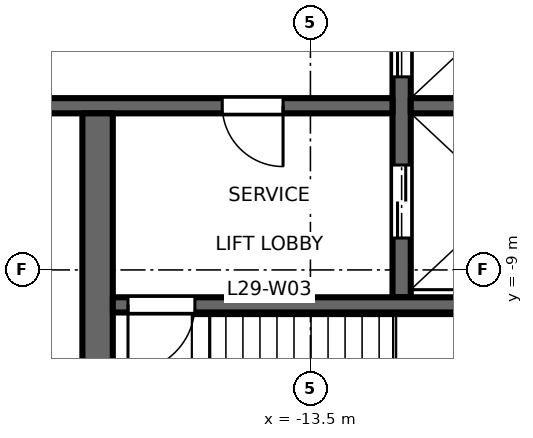
"""IFC4 building model, lengths in metres.
Left out: names, types, materials, properties, quantities, classifications, styles, units other than length and angle.
Written with IfcOpenShell. Run it as: python <this file> out.ifc"""

import sys

from ifc_helpers import new_model, si_unit, direction, frame, frame_2d, origin, place, context, subcontext, project, spatial, rectangle, extrude, element, fill, save


model = new_model("IFC4")
c1 = context("Model", 3, precision=1e-05, world=origin(), true_north=direction((0.0, 1.0)))
c2 = subcontext(c1, "Body", "Model", "MODEL_VIEW")
j1 = project(units=[si_unit("LENGTHUNIT", "METRE"), si_unit("PLANEANGLEUNIT", "RADIAN")], contexts=[c1])
p1 = place(None, origin())
s1 = spatial("IfcSite", under=j1, at=p1, CompositionType="ELEMENT")
p2 = place(p1, origin())
s2 = spatial("IfcBuilding", under=s1, at=p2, CompositionType="ELEMENT")
p3 = place(p2, frame((0.0, 0.0, 136.2)))
s3 = spatial("IfcBuildingStorey", under=s2, at=p3, CompositionType="ELEMENT", Elevation=136.2)
p4 = place(p3, frame((-12.0, -9.45, 0.0), z_axis=(0.0, 0.0, 1.0), x_axis=(0.0, 1.0, 0.0)))
e1 = element("IfcWall", 1, at=p4, inside=s3, PredefinedType="SHEAR", context=c2, shape_type="SweptSolid", body=[
    extrude(rectangle(XDim=18.9, YDim=0.3, at=frame_2d((9.45, 0.0))), origin(), (0.0, 0.0, 1.0), 4.35),
])
p5 = place(p4, frame((3.625, 0.0, 0.0)))
e2 = element("IfcOpeningElement", 2, at=p5, cuts=e1, PredefinedType="OPENING", context=c2, shape_type="SweptSolid", body=[
    extrude(rectangle(XDim=1.1, YDim=2.1, at=frame_2d((0.55, 1.05))), frame((0.0, 0.16, 0.0), z_axis=(0.0, -1.0, 0.0), x_axis=(1.0, 0.0, 0.0)), (0.0, 0.0, 1.0), 0.32),
])
p6 = place(p4, frame((6.775, 0.0, 0.0)))
e3 = element("IfcOpeningElement", 3, at=p6, cuts=e1, PredefinedType="OPENING", context=c2, shape_type="SweptSolid", body=[
    extrude(rectangle(XDim=1.1, YDim=2.1, at=frame_2d((0.55, 1.05))), frame((0.0, 0.16, 0.0), z_axis=(0.0, -1.0, 0.0), x_axis=(1.0, 0.0, 0.0)), (0.0, 0.0, 1.0), 0.32),
])
p7 = place(p4, frame((9.925, 0.0, 0.0)))
e4 = element("IfcOpeningElement", 4, at=p7, cuts=e1, PredefinedType="OPENING", context=c2, shape_type="SweptSolid", body=[
    extrude(rectangle(XDim=1.1, YDim=2.1, at=frame_2d((0.55, 1.05))), frame((0.0, 0.16, 0.0), z_axis=(0.0, -1.0, 0.0), x_axis=(1.0, 0.0, 0.0)), (0.0, 0.0, 1.0), 0.32),
])
p8 = place(p4, frame((13.075, 0.0, 0.0)))
e5 = element("IfcOpeningElement", 5, at=p8, cuts=e1, PredefinedType="OPENING", context=c2, shape_type="SweptSolid", body=[
    extrude(rectangle(XDim=1.1, YDim=2.1, at=frame_2d((0.55, 1.05))), frame((0.0, 0.16, 0.0), z_axis=(0.0, -1.0, 0.0), x_axis=(1.0, 0.0, 0.0)), (0.0, 0.0, 1.0), 0.32),
])
p9 = place(p4, frame((16.725, 0.0, 0.0)))
e6 = element("IfcOpeningElement", 6, at=p9, cuts=e1, PredefinedType="OPENING", context=c2, shape_type="SweptSolid", body=[
    extrude(rectangle(XDim=1.2, YDim=2.1, at=frame_2d((0.6, 1.05))), frame((0.0, 0.16, 0.0), z_axis=(0.0, -1.0, 0.0), x_axis=(1.0, 0.0, 0.0)), (0.0, 0.0, 1.0), 0.32),
])
p10 = place(p4, frame((0.975, 0.0, 0.0)))
e7 = element("IfcOpeningElement", 7, at=p10, cuts=e1, PredefinedType="OPENING", context=c2, shape_type="SweptSolid", body=[
    extrude(rectangle(XDim=1.2, YDim=2.1, at=frame_2d((0.6, 1.05))), frame((0.0, 0.16, 0.0), z_axis=(0.0, -1.0, 0.0), x_axis=(1.0, 0.0, 0.0)), (0.0, 0.0, 1.0), 0.32),
])
p11 = place(p3, frame((-12.15, -6.3, 0.0), z_axis=(0.0, 0.0, 1.0), x_axis=(-1.0, 0.0, 0.0)))
e8 = element("IfcWall", 8, at=p11, inside=s3, PredefinedType="SHEAR", context=c2, shape_type="SweptSolid", body=[
    extrude(rectangle(XDim=9.1, YDim=0.25, at=frame_2d((4.55, 0.0))), origin(), (0.0, 0.0, 1.0), 4.35),
])
p12 = place(p11, frame((1.8, 0.0, 0.0)))
e9 = element("IfcOpeningElement", 9, at=p12, cuts=e8, PredefinedType="OPENING", context=c2, shape_type="SweptSolid", body=[
    extrude(rectangle(XDim=1.0, YDim=2.1, at=frame_2d((0.5, 1.05))), frame((0.0, 0.135, 0.0), z_axis=(0.0, -1.0, 0.0), x_axis=(1.0, 0.0, 0.0)), (0.0, 0.0, 1.0), 0.27),
])
p13 = place(p11, frame((6.65, 0.0, 0.0)))
e10 = element("IfcOpeningElement", 10, at=p13, cuts=e8, PredefinedType="OPENING", context=c2, shape_type="SweptSolid", body=[
    extrude(rectangle(XDim=0.9, YDim=2.1, at=frame_2d((0.45, 1.05))), frame((0.0, 0.135, 0.0), z_axis=(0.0, -1.0, 0.0), x_axis=(1.0, 0.0, 0.0)), (0.0, 0.0, 1.0), 0.27),
])
p14 = place(p3, frame((-17.0, -13.0, 0.0), z_axis=(0.0, 0.0, 1.0), x_axis=(0.0, 1.0, 0.0)))
e11 = element("IfcWall", 11, at=p14, inside=s3, PredefinedType="SHEAR", context=c2, shape_type="SweptSolid", body=[
    extrude(rectangle(XDim=6.575, YDim=0.5, at=frame_2d((3.288, 0.0))), origin(), (0.0, 0.0, 1.0), 4.35),
])
p15 = place(p3, frame((-8.75, -6.3, 0.0), z_axis=(0.0, 0.0, 1.0), x_axis=(-1.0, 0.0, 0.0)))
e12 = element("IfcWall", 12, at=p15, inside=s3, PredefinedType="SHEAR", context=c2, shape_type="SweptSolid", body=[
    extrude(rectangle(XDim=3.1, YDim=0.25, at=frame_2d((1.55, 0.0))), origin(), (0.0, 0.0, 1.0), 4.35),
])
p16 = place(p3, frame((-8.75, -9.575, 0.0), z_axis=(0.0, 0.0, 1.0), x_axis=(-1.0, 0.0, 0.0)))
e13 = element("IfcWall", 13, at=p16, inside=s3, PredefinedType="SHEAR", context=c2, shape_type="SweptSolid", body=[
    extrude(rectangle(XDim=8.0, YDim=0.25, at=frame_2d((4.0, 0.0))), origin(), (0.0, 0.0, 1.0), 4.35),
])
p17 = place(p16, frame((6.65, 0.0, 0.0)))
e14 = element("IfcOpeningElement", 14, at=p17, cuts=e13, PredefinedType="OPENING", context=c2, shape_type="SweptSolid", body=[
    extrude(rectangle(XDim=1.1, YDim=2.1, at=frame_2d((0.55, 1.05))), frame((0.0, 0.135, 0.0), z_axis=(0.0, -1.0, 0.0), x_axis=(1.0, 0.0, 0.0)), (0.0, 0.0, 1.0), 0.27),
])
p18 = place(p12, origin())
e15 = element("IfcDoor", 15, at=p18, inside=s3, OperationType="SINGLE_SWING_RIGHT", PredefinedType="DOOR", context=c2, shape_type="SweptSolid", body=[
    extrude(rectangle(XDim=1.0, YDim=2.1, at=frame_2d((0.5, 1.05))), frame((0.0, 0.025, 0.0), z_axis=(0.0, -1.0, 0.0), x_axis=(1.0, 0.0, 0.0)), (0.0, 0.0, 1.0), 0.05),
])
fill(e9, e15)
p19 = place(p17, origin())
e16 = element("IfcDoor", 16, at=p19, inside=s3, OperationType="SINGLE_SWING_LEFT", PredefinedType="DOOR", context=c2, shape_type="SweptSolid", body=[
    extrude(rectangle(XDim=1.1, YDim=2.1, at=frame_2d((0.55, 1.05))), frame((0.0, 0.025, 0.0), z_axis=(0.0, -1.0, 0.0), x_axis=(1.0, 0.0, 0.0)), (0.0, 0.0, 1.0), 0.05),
])
fill(e14, e16)
p20 = place(p5, origin())
e17 = element("IfcDoor", 17, at=p20, inside=s3, OperationType="DOUBLE_DOOR_SLIDING", PredefinedType="DOOR", context=c2, shape_type="SweptSolid", body=[
    extrude(rectangle(XDim=1.1, YDim=2.1, at=frame_2d((0.55, 1.05))), frame((0.0, 0.025, 0.0), z_axis=(0.0, -1.0, 0.0), x_axis=(1.0, 0.0, 0.0)), (0.0, 0.0, 1.0), 0.05),
])
fill(e2, e17)
p21 = place(p10, origin())
e18 = element("IfcDoor", 18, at=p21, inside=s3, OperationType="DOUBLE_DOOR_SLIDING", PredefinedType="DOOR", context=c2, shape_type="SweptSolid", body=[
    extrude(rectangle(XDim=1.2, YDim=2.1, at=frame_2d((0.6, 1.05))), frame((0.0, 0.025, 0.0), z_axis=(0.0, -1.0, 0.0), x_axis=(1.0, 0.0, 0.0)), (0.0, 0.0, 1.0), 0.05),
])
fill(e7, e18)
save(model, sys.argv[1])
